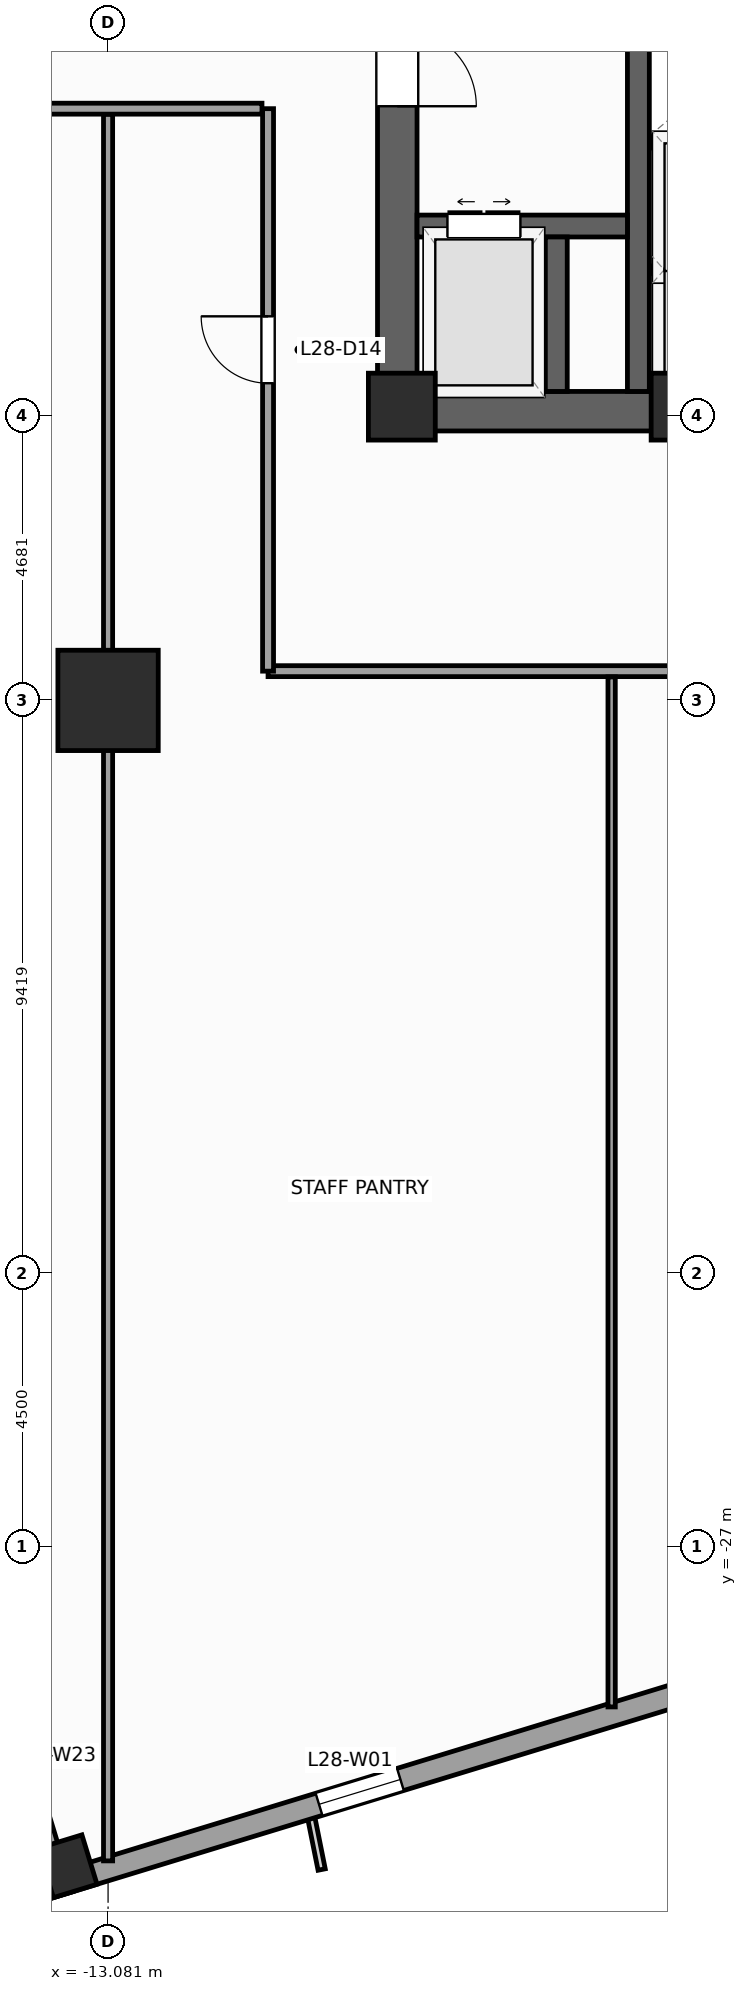
"""IFC4 building model, lengths in metres.
Left out: names, types, materials, properties, quantities, classifications, styles, units other than length and angle.
Written with IfcOpenShell. Run it as: python <this file> out.ifc"""

import sys

from ifc_helpers import new_model, si_unit, direction, frame, frame_2d, origin, origin_2d, place, context, subcontext, project, spatial, rectangle, extrude, source, transform, mapped, element, fill, save


model = new_model("IFC4")
c1 = context("Model", 3, precision=1e-05, world=origin(), true_north=direction((0.0, 1.0)))
c2 = subcontext(c1, "Body", "Model", "MODEL_VIEW")
j1 = project(units=[si_unit("LENGTHUNIT", "METRE"), si_unit("PLANEANGLEUNIT", "RADIAN")], contexts=[c1])
p1 = place(None, origin())
s1 = spatial("IfcSite", under=j1, at=p1, CompositionType="ELEMENT")
p2 = place(p1, origin())
s2 = spatial("IfcBuilding", under=s1, at=p2, CompositionType="ELEMENT")
p3 = place(p2, frame((0.0, 0.0, 119.2)))
s3 = spatial("IfcBuildingStorey", under=s2, at=p3, CompositionType="ELEMENT", Elevation=119.2)
p4 = place(p3, frame((-8.65, -8.325, 0.0), z_axis=(0.0, 0.0, 1.0), x_axis=(1.0, 0.0, 0.0)))
e1 = element("IfcWall", 1, at=p4, inside=s3, PredefinedType="SHEAR", context=c2, shape_type="SweptSolid", body=[
    extrude(rectangle(XDim=17.3, YDim=0.65, at=frame_2d((8.65, 0.0))), origin(), (0.0, 0.0, 1.0), 4.0),
])
p5 = place(p4, frame((8.0, 0.0, 0.0)))
e2 = element("IfcOpeningElement", 2, at=p5, cuts=e1, PredefinedType="OPENING", context=c2, shape_type="SweptSolid", body=[
    extrude(rectangle(XDim=1.3, YDim=2.2, at=frame_2d((0.65, 1.1))), frame((0.0, 0.335, 0.0), z_axis=(0.0, -1.0, 0.0), x_axis=(1.0, 0.0, 0.0)), (0.0, 0.0, 1.0), 0.67),
])
p6 = place(p3, frame((-8.325, -8.0, 0.0), z_axis=(0.0, 0.0, 1.0), x_axis=(0.0, 1.0, 0.0)))
e3 = element("IfcWall", 3, at=p6, inside=s3, PredefinedType="SHEAR", context=c2, shape_type="SweptSolid", body=[
    extrude(rectangle(XDim=16.0, YDim=0.65, at=frame_2d((8.0, 0.0))), origin(), (0.0, 0.0, 1.0), 4.0),
])
p7 = place(p6, frame((4.69, 0.0, 0.0)))
e4 = element("IfcOpeningElement", 4, at=p7, cuts=e3, PredefinedType="OPENING", context=c2, shape_type="SweptSolid", body=[
    extrude(rectangle(XDim=1.3, YDim=2.2, at=frame_2d((0.65, 1.1))), frame((0.0, 0.335, 0.0), z_axis=(0.0, -1.0, 0.0), x_axis=(1.0, 0.0, 0.0)), (0.0, 0.0, 1.0), 0.67),
])
p8 = place(p3, frame((-4.36, -8.0, 0.0), z_axis=(0.0, 0.0, 1.0), x_axis=(0.0, 1.0, 0.0)))
e5 = element("IfcWall", 5, at=p8, inside=s3, PredefinedType="SHEAR", context=c2, shape_type="SweptSolid", body=[
    extrude(rectangle(XDim=16.0, YDim=0.36, at=frame_2d((8.0, 0.0))), origin(), (0.0, 0.0, 1.0), 4.0),
])
p9 = place(p3, frame((-8.0, -5.28, 0.0), z_axis=(0.0, 0.0, 1.0), x_axis=(1.0, 0.0, 0.0)))
e6 = element("IfcWall", 6, at=p9, inside=s3, PredefinedType="SHEAR", context=c2, shape_type="SweptSolid", body=[
    extrude(rectangle(XDim=3.46, YDim=0.36, at=frame_2d((1.73, 0.0))), origin(), (0.0, 0.0, 1.0), 4.0),
])
p10 = place(p9, frame((0.5, 0.0, 0.0)))
e7 = element("IfcOpeningElement", 7, at=p10, cuts=e6, PredefinedType="OPENING", context=c2, shape_type="SweptSolid", body=[
    extrude(rectangle(XDim=1.2, YDim=2.25, at=frame_2d((0.6, 1.125))), frame((0.0, 0.19, 0.0), z_axis=(0.0, -1.0, 0.0), x_axis=(1.0, 0.0, 0.0)), (0.0, 0.0, 1.0), 0.38),
])
p11 = place(p3, frame((-5.71, -8.0, 0.0), z_axis=(0.0, 0.0, 1.0), x_axis=(0.0, 1.0, 0.0)))
e8 = element("IfcWall", 8, at=p11, inside=s3, PredefinedType="SHEAR", context=c2, shape_type="SweptSolid", body=[
    extrude(rectangle(XDim=2.54, YDim=0.36, at=frame_2d((1.27, 0.0))), origin(), (0.0, 0.0, 1.0), 4.0),
])
m1 = source(origin(), c2, "Body", "SweptSolid", [
    extrude(rectangle(XDim=1.1, YDim=1.1, at=origin_2d()), origin(), (0.0, 0.0, 1.0), 4.0),
])
for number, where, z_axis, x_axis in (
    (9, (-8.25, -8.25, 0.0), (0.0, 0.0, 1.0), (1.0, 0.0, 0.0)),
    (10, (-3.6, -8.25, 0.0), (0.0, 0.0, 1.0), (1.0, 0.0, 0.0)),
):
    element("IfcColumn", number, at=place(p3, frame(where, z_axis=z_axis, x_axis=x_axis)), inside=s3, PredefinedType="PILASTER", context=c2, shape_type="MappedRepresentation", body=[
        mapped(m1, transform((0.0, 0.0, 0.0), scale=1.0)),
    ])
m2 = source(origin(), c2, "Body", "SweptSolid", [
    extrude(rectangle(XDim=1.65, YDim=1.65, at=origin_2d()), origin(), (0.0, 0.0, 1.0), 4.0),
])
p12 = place(p3, frame((-13.081, -13.081, 0.0), z_axis=(0.0, 0.0, 1.0), x_axis=(1.0, 0.0, 0.0)))
e11 = element("IfcColumn", 11, at=p12, inside=s3, PredefinedType="COLUMN", context=c2, shape_type="MappedRepresentation", body=[
    mapped(m2, transform((0.0, 0.0, 0.0), scale=1.0)),
])
m3 = source(origin(), c2, "Body", "SweptSolid", [
    extrude(rectangle(XDim=0.75, YDim=0.85, at=origin_2d()), origin(), (0.0, 0.0, 1.0), 4.0),
])
p13 = place(p3, frame((-13.746, -32.253, 0.0), z_axis=(0.0, 0.0, 1.0), x_axis=(0.956304755963, 0.292371704723, 0.0)))
e12 = element("IfcColumn", 12, at=p13, inside=s3, PredefinedType="COLUMN", context=c2, shape_type="MappedRepresentation", body=[
    mapped(m3, transform((0.0, 0.0, 0.0), scale=1.0)),
])
p14 = place(p3, frame((-14.265, -32.658, 0.0), z_axis=(0.0, 0.0, 1.0), x_axis=(0.956304320851, 0.292373127906, 0.0)))
e13 = element("IfcWall", 13, at=p14, inside=s3, PredefinedType="STANDARD", context=c2, shape_type="SweptSolid", body=[
    extrude(rectangle(XDim=46.38, YDim=0.38, at=frame_2d((23.19, 0.0))), origin(), (0.0, 0.0, 1.0), 3.14),
])
p15 = place(p14, frame((4.865, 0.0, 0.51)))
e14 = element("IfcOpeningElement", 14, at=p15, cuts=e13, PredefinedType="OPENING", context=c2, shape_type="SweptSolid", body=[
    extrude(rectangle(XDim=1.4, YDim=2.4, at=frame_2d((0.7, 1.2))), frame((0.0, 0.2, 0.0), z_axis=(0.0, -1.0, 0.0), x_axis=(1.0, 0.0, 0.0)), (0.0, 0.0, 1.0), 0.4),
])
p16 = place(p14, frame((10.95, 0.0, 0.51)))
e15 = element("IfcOpeningElement", 15, at=p16, cuts=e13, PredefinedType="OPENING", context=c2, shape_type="SweptSolid", body=[
    extrude(rectangle(XDim=2.0, YDim=2.4, at=frame_2d((1.0, 1.2))), frame((0.0, 0.2, 0.0), z_axis=(0.0, -1.0, 0.0), x_axis=(1.0, 0.0, 0.0)), (0.0, 0.0, 1.0), 0.4),
])
p17 = place(p14, frame((20.512, 0.0, 0.51)))
e16 = element("IfcOpeningElement", 16, at=p17, cuts=e13, PredefinedType="OPENING", context=c2, shape_type="SweptSolid", body=[
    extrude(rectangle(XDim=2.0, YDim=2.4, at=frame_2d((1.0, 1.2))), frame((0.0, 0.2, 0.0), z_axis=(0.0, -1.0, 0.0), x_axis=(1.0, 0.0, 0.0)), (0.0, 0.0, 1.0), 0.4),
])
p18 = place(p14, frame((30.538, 0.0, 0.51)))
e17 = element("IfcOpeningElement", 17, at=p18, cuts=e13, PredefinedType="OPENING", context=c2, shape_type="SweptSolid", body=[
    extrude(rectangle(XDim=2.0, YDim=2.4, at=frame_2d((1.0, 1.2))), frame((0.0, 0.2, 0.0), z_axis=(0.0, -1.0, 0.0), x_axis=(1.0, 0.0, 0.0)), (0.0, 0.0, 1.0), 0.4),
])
p19 = place(p14, frame((39.187, 0.0, 0.51)))
e18 = element("IfcOpeningElement", 18, at=p19, cuts=e13, PredefinedType="OPENING", context=c2, shape_type="SweptSolid", body=[
    extrude(rectangle(XDim=1.4, YDim=2.4, at=frame_2d((0.7, 1.2))), frame((0.0, 0.2, 0.0), z_axis=(0.0, -1.0, 0.0), x_axis=(1.0, 0.0, 0.0)), (0.0, 0.0, 1.0), 0.4),
])
p20 = place(p3, frame((-15.144, -28.482, 0.0), z_axis=(0.0, 0.0, 1.0), x_axis=(0.292373601522, -0.956304176051, 0.0)))
e19 = element("IfcWall", 19, at=p20, inside=s3, PredefinedType="STANDARD", context=c2, shape_type="SweptSolid", body=[
    extrude(rectangle(XDim=4.44, YDim=0.38, at=frame_2d((2.22, 0.0))), origin(), (0.0, 0.0, 1.0), 3.04),
])
p21 = place(p20, frame((1.52, 0.0, 0.51)))
e20 = element("IfcOpeningElement", 20, at=p21, cuts=e19, PredefinedType="OPENING", context=c2, shape_type="SweptSolid", body=[
    extrude(rectangle(XDim=1.4, YDim=2.4, at=frame_2d((0.7, 1.2))), frame((0.0, 0.2, 0.0), z_axis=(0.0, -1.0, 0.0), x_axis=(1.0, 0.0, 0.0)), (0.0, 0.0, 1.0), 0.4),
])
p22 = place(p3, frame((-4.17, -3.9, 0.0), z_axis=(0.0, 0.0, 1.0), x_axis=(1.0, 0.0, 0.0)))
e21 = element("IfcWall", 21, at=p22, inside=s3, PredefinedType="PARTITIONING", context=c2, shape_type="SweptSolid", body=[
    extrude(rectangle(XDim=2.28, YDim=0.18, at=frame_2d((1.14, 0.0))), origin(), (0.0, 0.0, 1.0), 3.74),
])
p23 = place(p3, frame((-4.16, -6.0, 0.0), z_axis=(0.0, 0.0, 1.0), x_axis=(1.0, 0.0, 0.0)))
e22 = element("IfcWall", 22, at=p23, inside=s3, PredefinedType="PARTITIONING", context=c2, shape_type="SweptSolid", body=[
    extrude(rectangle(XDim=2.26, YDim=0.12, at=frame_2d((1.13, 0.0))), origin(), (0.0, 0.0, 1.0), 3.74),
])
p24 = place(p3, frame((-10.45, -12.6, 0.0), z_axis=(0.0, 0.0, 1.0), x_axis=(1.0, 0.0, 0.0)))
e23 = element("IfcWall", 23, at=p24, inside=s3, PredefinedType="PARTITIONING", context=c2, shape_type="SweptSolid", body=[
    extrude(rectangle(XDim=9.3, YDim=0.18, at=frame_2d((4.65, 0.0))), origin(), (0.0, 0.0, 1.0), 3.74),
])
p25 = place(p3, frame((-10.45, -12.6, 0.0), z_axis=(0.0, 0.0, 1.0), x_axis=(0.0, 1.0, 0.0)))
e24 = element("IfcWall", 24, at=p25, inside=s3, PredefinedType="PARTITIONING", context=c2, shape_type="SweptSolid", body=[
    extrude(rectangle(XDim=9.25, YDim=0.18, at=frame_2d((4.625, 0.0))), origin(), (0.0, 0.0, 1.0), 3.74),
])
p26 = place(p25, frame((4.735, 0.0, 0.0)))
e25 = element("IfcOpeningElement", 25, at=p26, cuts=e24, PredefinedType="OPENING", context=c2, shape_type="SweptSolid", body=[
    extrude(rectangle(XDim=1.1, YDim=2.2, at=frame_2d((0.55, 1.1))), frame((0.0, 0.1, 0.0), z_axis=(0.0, -1.0, 0.0), x_axis=(1.0, 0.0, 0.0)), (0.0, 0.0, 1.0), 0.2),
])
p27 = place(p3, frame((-27.142, -3.35, 0.0), z_axis=(0.0, 0.0, 1.0), x_axis=(1.0, 0.0, 0.0)))
e26 = element("IfcWall", 26, at=p27, inside=s3, PredefinedType="PARTITIONING", context=c2, shape_type="SweptSolid", body=[
    extrude(rectangle(XDim=16.592, YDim=0.18, at=frame_2d((8.296, 0.0))), origin(), (0.0, 0.0, 1.0), 3.74),
])
p28 = place(p27, frame((6.645, 0.0, 0.0)))
e27 = element("IfcOpeningElement", 27, at=p28, cuts=e26, PredefinedType="OPENING", context=c2, shape_type="SweptSolid", body=[
    extrude(rectangle(XDim=1.1, YDim=2.2, at=frame_2d((0.55, 1.1))), frame((0.0, 0.1, 0.0), z_axis=(0.0, -1.0, 0.0), x_axis=(1.0, 0.0, 0.0)), (0.0, 0.0, 1.0), 0.2),
])
p29 = place(p3, frame((-13.081, -32.165, 0.0), z_axis=(0.0, 0.0, 1.0), x_axis=(0.0, 1.0, 0.0)))
e28 = element("IfcWall", 28, at=p29, inside=s3, PredefinedType="PARTITIONING", context=c2, shape_type="SweptSolid", body=[
    extrude(rectangle(XDim=28.72, YDim=0.15, at=frame_2d((14.36, 0.0))), origin(), (0.0, 0.0, 1.0), 2.732),
])
p30 = place(p3, frame((-4.8, -29.633, 0.0), z_axis=(0.0, 0.0, 1.0), x_axis=(0.0, 1.0, 0.0)))
e29 = element("IfcWall", 29, at=p30, inside=s3, PredefinedType="PARTITIONING", context=c2, shape_type="SweptSolid", body=[
    extrude(rectangle(XDim=16.938, YDim=0.12, at=frame_2d((8.469, 0.0))), origin(), (0.0, 0.0, 1.0), 3.74),
])
m4 = source(origin(), c2, "Body", "SweptSolid", [
    extrude(rectangle(XDim=1.4, YDim=2.4, at=frame_2d((0.7, 1.2))), frame((0.0, 0.03, 0.0), z_axis=(0.0, -1.0, 0.0), x_axis=(1.0, 0.0, 0.0)), (0.0, 0.0, 1.0), 0.06),
])
p31 = place(p15, origin())
e30 = element("IfcWindow", 30, at=p31, inside=s3, PartitioningType="SINGLE_PANEL", PredefinedType="WINDOW", context=c2, shape_type="MappedRepresentation", body=[
    mapped(m4, transform((0.0, 0.0, 0.0), scale=1.0)),
])
fill(e14, e30)
m5 = source(origin(), c2, "Body", "SweptSolid", [
    extrude(rectangle(XDim=1.3, YDim=2.2, at=frame_2d((0.65, 1.1))), frame((0.0, 0.025, 0.0), z_axis=(0.0, -1.0, 0.0), x_axis=(1.0, 0.0, 0.0)), (0.0, 0.0, 1.0), 0.05),
])
p32 = place(p7, frame((1.3, 0.0, 0.0), z_axis=(0.0, 0.0, 1.0), x_axis=(-1.0, 0.0, 0.0)))
e31 = element("IfcDoor", 31, at=p32, inside=s3, OperationType="SINGLE_SWING_LEFT", PredefinedType="DOOR", context=c2, shape_type="MappedRepresentation", body=[
    mapped(m5, transform((0.0, 0.0, 0.0), scale=1.0)),
])
fill(e4, e31)
m6 = source(origin(), c2, "Body", "SweptSolid", [
    extrude(rectangle(XDim=1.2, YDim=2.25, at=frame_2d((0.6, 1.125))), frame((0.0, 0.025, 0.0), z_axis=(0.0, -1.0, 0.0), x_axis=(1.0, 0.0, 0.0)), (0.0, 0.0, 1.0), 0.05),
])
p33 = place(p10, origin())
e32 = element("IfcDoor", 32, at=p33, inside=s3, OperationType="DOUBLE_DOOR_SLIDING", PredefinedType="DOOR", context=c2, shape_type="MappedRepresentation", body=[
    mapped(m6, transform((0.0, 0.0, 0.0), scale=1.0)),
])
fill(e7, e32)
m7 = source(origin(), c2, "Body", "SweptSolid", [
    extrude(rectangle(XDim=1.1, YDim=2.2, at=frame_2d((0.55, 1.1))), frame((0.0, 0.025, 0.0), z_axis=(0.0, -1.0, 0.0), x_axis=(1.0, 0.0, 0.0)), (0.0, 0.0, 1.0), 0.05),
])
p34 = place(p26, origin())
e33 = element("IfcDoor", 33, at=p34, inside=s3, OperationType="SINGLE_SWING_RIGHT", PredefinedType="DOOR", context=c2, shape_type="MappedRepresentation", body=[
    mapped(m7, transform((0.0, 0.0, 0.0), scale=1.0)),
])
fill(e25, e33)
save(model, sys.argv[1])
